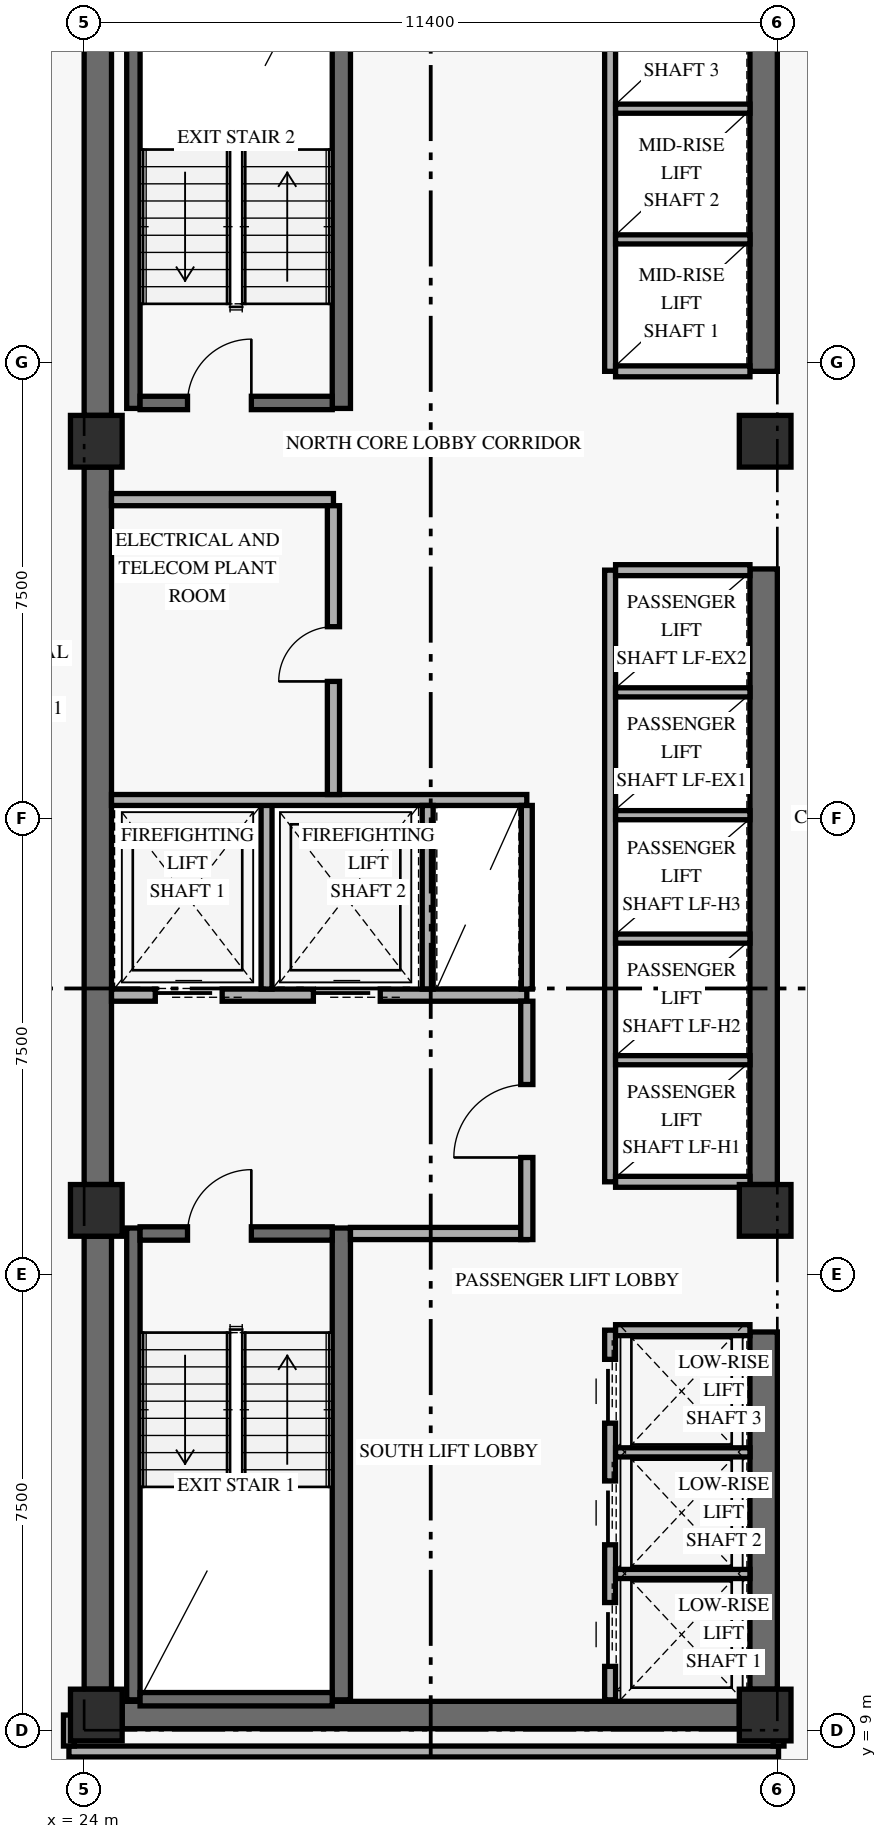
"""IFC4 building model, lengths in metres.
Left out: names, types, materials, properties, quantities, classifications, styles, units other than length and angle.
Written with IfcOpenShell. Run it as: python <this file> out.ifc"""

import sys

from ifc_helpers import new_model, si_unit, direction, frame, frame_2d, origin, origin_2d, place, context, subcontext, project, spatial, rectangle, extrude, element, fill, save


model = new_model("IFC4")
c1 = context("Model", 3, precision=1e-05, world=origin(), true_north=direction((0.0, 1.0)))
c2 = subcontext(c1, "Body", "Model", "MODEL_VIEW")
j1 = project(units=[si_unit("LENGTHUNIT", "METRE"), si_unit("PLANEANGLEUNIT", "RADIAN")], contexts=[c1])
p1 = place(None, origin())
s1 = spatial("IfcSite", under=j1, at=p1, CompositionType="ELEMENT")
p2 = place(p1, origin())
s2 = spatial("IfcBuilding", under=s1, at=p2, CompositionType="ELEMENT")
p3 = place(p2, frame((0.0, 0.0, 84.0)))
s3 = spatial("IfcBuildingStorey", under=s2, at=p3, CompositionType="ELEMENT", Elevation=84.0)
p4 = place(p3, frame((24.225, 9.675, 0.0), z_axis=(0.0, 0.0, 1.0), x_axis=(0.0, 1.0, 0.0)))
e1 = element("IfcWall", 1, at=p4, inside=s3, PredefinedType="SHEAR", context=c2, shape_type="SweptSolid", body=[
    extrude(rectangle(XDim=7.45, YDim=0.45, at=frame_2d((3.725, 0.0))), origin(), (0.0, 0.0, 1.0), 2.749),
])
p5 = place(p3, frame((24.225, 17.975, 0.0), z_axis=(0.0, 0.0, 1.0), x_axis=(0.0, 1.0, 0.0)))
e2 = element("IfcWall", 2, at=p5, inside=s3, PredefinedType="SHEAR", context=c2, shape_type="SweptSolid", body=[
    extrude(rectangle(XDim=11.8, YDim=0.45, at=frame_2d((5.9, 0.0))), origin(), (0.0, 0.0, 1.0), 2.749),
])
p6 = place(p3, frame((24.225, 30.625, 0.0), z_axis=(0.0, 0.0, 1.0), x_axis=(0.0, 1.0, 0.0)))
e3 = element("IfcWall", 3, at=p6, inside=s3, PredefinedType="SHEAR", context=c2, shape_type="SweptSolid", body=[
    extrude(rectangle(XDim=7.7, YDim=0.45, at=frame_2d((3.85, 0.0))), origin(), (0.0, 0.0, 1.0), 2.749),
])
p7 = place(p3, frame((35.175, 9.675, 0.0), z_axis=(0.0, 0.0, 1.0), x_axis=(0.0, 1.0, 0.0)))
e4 = element("IfcWall", 4, at=p7, inside=s3, PredefinedType="SHEAR", context=c2, shape_type="SweptSolid", body=[
    extrude(rectangle(XDim=5.875, YDim=0.45, at=frame_2d((2.938, 0.0))), origin(), (0.0, 0.0, 1.0), 2.749),
])
p8 = place(p3, frame((35.175, 17.975, 0.0), z_axis=(0.0, 0.0, 1.0), x_axis=(0.0, 1.0, 0.0)))
e5 = element("IfcWall", 5, at=p8, inside=s3, PredefinedType="SHEAR", context=c2, shape_type="SweptSolid", body=[
    extrude(rectangle(XDim=10.125, YDim=0.45, at=frame_2d((5.062, 0.0))), origin(), (0.0, 0.0, 1.0), 2.749),
])
p9 = place(p3, frame((35.175, 31.35, 0.0), z_axis=(0.0, 0.0, 1.0), x_axis=(0.0, 1.0, 0.0)))
e6 = element("IfcWall", 6, at=p9, inside=s3, PredefinedType="SHEAR", context=c2, shape_type="SweptSolid", body=[
    extrude(rectangle(XDim=6.975, YDim=0.45, at=frame_2d((3.487, 0.0))), origin(), (0.0, 0.0, 1.0), 2.749),
])
p10 = place(p3, frame((24.625, 9.25, 0.0), z_axis=(0.0, 0.0, 1.0), x_axis=(1.0, 0.0, 0.0)))
e7 = element("IfcWall", 7, at=p10, inside=s3, PredefinedType="SHEAR", context=c2, shape_type="SweptSolid", body=[
    extrude(rectangle(XDim=10.15, YDim=0.45, at=frame_2d((5.075, 0.0))), origin(), (0.0, 0.0, 1.0), 3.36),
])
p11 = place(p3, frame((24.81, 9.5, 0.0), z_axis=(0.0, 0.0, 1.0), x_axis=(0.0, 1.0, 0.0)))
e8 = element("IfcWall", 8, at=p11, inside=s3, PredefinedType="SHEAR", context=c2, shape_type="SweptSolid", body=[
    extrude(rectangle(XDim=7.76, YDim=0.22, at=frame_2d((3.88, 0.0))), origin(), (0.0, 0.0, 1.0), 3.36),
])
p12 = place(p3, frame((28.23, 9.5, 0.0), z_axis=(0.0, 0.0, 1.0), x_axis=(0.0, 1.0, 0.0)))
e9 = element("IfcWall", 9, at=p12, inside=s3, PredefinedType="SHEAR", context=c2, shape_type="SweptSolid", body=[
    extrude(rectangle(XDim=7.76, YDim=0.3, at=frame_2d((3.88, 0.0))), origin(), (0.0, 0.0, 1.0), 3.36),
])
p13 = place(p3, frame((24.92, 9.51, 0.0), z_axis=(0.0, 0.0, 1.0), x_axis=(1.0, 0.0, 0.0)))
e10 = element("IfcWall", 10, at=p13, inside=s3, PredefinedType="SHEAR", context=c2, shape_type="SweptSolid", body=[
    extrude(rectangle(XDim=3.16, YDim=0.22, at=frame_2d((1.58, 0.0))), origin(), (0.0, 0.0, 1.0), 3.36),
])
p14 = place(p3, frame((24.92, 17.17, 0.0), z_axis=(0.0, 0.0, 1.0), x_axis=(1.0, 0.0, 0.0)))
e11 = element("IfcWall", 11, at=p14, inside=s3, PredefinedType="SHEAR", context=c2, shape_type="SweptSolid", body=[
    extrude(rectangle(XDim=3.16, YDim=0.22, at=frame_2d((1.58, 0.0))), origin(), (0.0, 0.0, 1.0), 3.36),
])
p15 = place(p14, frame((0.78, 0.0, 0.0)))
e12 = element("IfcOpeningElement", 12, at=p15, cuts=e11, PredefinedType="OPENING", context=c2, shape_type="SweptSolid", body=[
    extrude(rectangle(XDim=1.05, YDim=2.15, at=frame_2d((0.525, 1.075))), frame((0.0, 0.12, 0.0), z_axis=(0.0, -1.0, 0.0), x_axis=(1.0, 0.0, 0.0)), (0.0, 0.0, 1.0), 0.24),
])
p16 = place(p3, frame((24.81, 30.74, 0.0), z_axis=(0.0, 0.0, 1.0), x_axis=(0.0, 1.0, 0.0)))
e13 = element("IfcWall", 13, at=p16, inside=s3, PredefinedType="SHEAR", context=c2, shape_type="SweptSolid", body=[
    extrude(rectangle(XDim=7.76, YDim=0.22, at=frame_2d((3.88, 0.0))), origin(), (0.0, 0.0, 1.0), 3.36),
])
p17 = place(p3, frame((28.23, 30.74, 0.0), z_axis=(0.0, 0.0, 1.0), x_axis=(0.0, 1.0, 0.0)))
e14 = element("IfcWall", 14, at=p17, inside=s3, PredefinedType="SHEAR", context=c2, shape_type="SweptSolid", body=[
    extrude(rectangle(XDim=7.76, YDim=0.3, at=frame_2d((3.88, 0.0))), origin(), (0.0, 0.0, 1.0), 3.36),
])
p18 = place(p3, frame((24.92, 30.83, 0.0), z_axis=(0.0, 0.0, 1.0), x_axis=(1.0, 0.0, 0.0)))
e15 = element("IfcWall", 15, at=p18, inside=s3, PredefinedType="SHEAR", context=c2, shape_type="SweptSolid", body=[
    extrude(rectangle(XDim=3.16, YDim=0.22, at=frame_2d((1.58, 0.0))), origin(), (0.0, 0.0, 1.0), 3.36),
])
p19 = place(p18, frame((0.78, 0.0, 0.0)))
e16 = element("IfcOpeningElement", 16, at=p19, cuts=e15, PredefinedType="OPENING", context=c2, shape_type="SweptSolid", body=[
    extrude(rectangle(XDim=1.05, YDim=2.15, at=frame_2d((0.525, 1.075))), frame((0.0, 0.12, 0.0), z_axis=(0.0, -1.0, 0.0), x_axis=(1.0, 0.0, 0.0)), (0.0, 0.0, 1.0), 0.24),
])
for number, where, z_axis, x_axis in (
    (17, (24.2, 9.25, 0.0), (0.0, 0.0, 1.0), (1.0, 0.0, 0.0)),
    (18, (24.2, 17.55, 0.0), (0.0, 0.0, 1.0), (1.0, 0.0, 0.0)),
    (19, (24.2, 30.2, 0.0), (0.0, 0.0, 1.0), (1.0, 0.0, 0.0)),
    (20, (35.2, 9.25, 0.0), (0.0, 0.0, 1.0), (1.0, 0.0, 0.0)),
    (21, (35.2, 17.55, 0.0), (0.0, 0.0, 1.0), (1.0, 0.0, 0.0)),
    (22, (35.2, 30.2, 0.0), (0.0, 0.0, 1.0), (1.0, 0.0, 0.0)),
):
    element("IfcColumn", number, at=place(p3, frame(where, z_axis=z_axis, x_axis=x_axis)), inside=s3, PredefinedType="COLUMN", context=c2, shape_type="SweptSolid", body=[
        extrude(rectangle(XDim=0.85, YDim=0.85, at=origin_2d()), origin(), (0.0, 0.0, 1.0), 3.6),
    ])
p20 = place(p3, frame((24.45, 21.09, 0.0), z_axis=(0.0, 0.0, 1.0), x_axis=(1.0, 0.0, 0.0)))
e23 = element("IfcWall", 23, at=p20, inside=s3, PredefinedType="STANDARD", context=c2, shape_type="SweptSolid", body=[
    extrude(rectangle(XDim=6.83, YDim=0.2, at=frame_2d((3.415, 0.0))), origin(), (0.0, 0.0, 1.0), 3.36),
])
p21 = place(p20, frame((0.72, 0.0, 0.0)))
e24 = element("IfcOpeningElement", 24, at=p21, cuts=e23, PredefinedType="OPENING", context=c2, shape_type="SweptSolid", body=[
    extrude(rectangle(XDim=1.1, YDim=2.2, at=frame_2d((0.55, 1.1))), frame((0.0, 0.11, 0.0), z_axis=(0.0, -1.0, 0.0), x_axis=(1.0, 0.0, 0.0)), (0.0, 0.0, 1.0), 0.22),
])
p22 = place(p20, frame((3.32, 0.0, 0.0)))
e25 = element("IfcOpeningElement", 25, at=p22, cuts=e23, PredefinedType="OPENING", context=c2, shape_type="SweptSolid", body=[
    extrude(rectangle(XDim=1.1, YDim=2.2, at=frame_2d((0.55, 1.1))), frame((0.0, 0.11, 0.0), z_axis=(0.0, -1.0, 0.0), x_axis=(1.0, 0.0, 0.0)), (0.0, 0.0, 1.0), 0.22),
])
p23 = place(p3, frame((28.38, 17.17, 0.0), z_axis=(0.0, 0.0, 1.0), x_axis=(1.0, 0.0, 0.0)))
e26 = element("IfcWall", 26, at=p23, inside=s3, PredefinedType="STANDARD", context=c2, shape_type="SweptSolid", body=[
    extrude(rectangle(XDim=2.9, YDim=0.2, at=frame_2d((1.45, 0.0))), origin(), (0.0, 0.0, 1.0), 3.36),
])
p24 = place(p3, frame((31.28, 17.07, 0.0), z_axis=(0.0, 0.0, 1.0), x_axis=(0.0, 1.0, 0.0)))
e27 = element("IfcWall", 27, at=p24, inside=s3, PredefinedType="STANDARD", context=c2, shape_type="SweptSolid", body=[
    extrude(rectangle(XDim=3.92, YDim=0.2, at=frame_2d((1.96, 0.0))), origin(), (0.0, 0.0, 1.0), 2.731),
])
p25 = place(p24, frame((1.35, 0.0, 0.0)))
e28 = element("IfcOpeningElement", 28, at=p25, cuts=e27, PredefinedType="OPENING", context=c2, shape_type="SweptSolid", body=[
    extrude(rectangle(XDim=1.2, YDim=2.15, at=frame_2d((0.6, 1.075))), frame((0.0, 0.11, 0.0), z_axis=(0.0, -1.0, 0.0), x_axis=(1.0, 0.0, 0.0)), (0.0, 0.0, 1.0), 0.22),
])
p26 = place(p3, frame((27.0, 21.19, 0.0), z_axis=(0.0, 0.0, 1.0), x_axis=(0.0, 1.0, 0.0)))
e29 = element("IfcWall", 29, at=p26, inside=s3, PredefinedType="STANDARD", context=c2, shape_type="SweptSolid", body=[
    extrude(rectangle(XDim=3.11, YDim=0.18, at=frame_2d((1.555, 0.0))), origin(), (0.0, 0.0, 1.0), 3.36),
])
p27 = place(p3, frame((24.45, 24.3, 0.0), z_axis=(0.0, 0.0, 1.0), x_axis=(1.0, 0.0, 0.0)))
e30 = element("IfcWall", 30, at=p27, inside=s3, PredefinedType="STANDARD", context=c2, shape_type="SweptSolid", body=[
    extrude(rectangle(XDim=6.83, YDim=0.18, at=frame_2d((3.415, 0.0))), origin(), (0.0, 0.0, 1.0), 3.36),
])
for number, where, z_axis, x_axis in (
    (31, (29.65, 21.19, 0.0), (0.0, 0.0, 1.0), (0.0, 1.0, 0.0)),
    (32, (31.28, 21.19, 0.0), (0.0, 0.0, 1.0), (0.0, 1.0, 0.0)),
):
    element("IfcWall", number, at=place(p3, frame(where, z_axis=z_axis, x_axis=x_axis)), inside=s3, PredefinedType="STANDARD", context=c2, shape_type="SweptSolid", body=[
        extrude(rectangle(XDim=3.02, YDim=0.18, at=frame_2d((1.51, 0.0))), origin(), (0.0, 0.0, 1.0), 3.36),
    ])
p28 = place(p3, frame((24.45, 29.24, 0.0), z_axis=(0.0, 0.0, 1.0), x_axis=(1.0, 0.0, 0.0)))
e33 = element("IfcWall", 33, at=p28, inside=s3, PredefinedType="STANDARD", context=c2, shape_type="SweptSolid", body=[
    extrude(rectangle(XDim=3.65, YDim=0.2, at=frame_2d((1.825, 0.0))), origin(), (0.0, 0.0, 1.0), 3.36),
])
p29 = place(p3, frame((28.1, 24.39, 0.0), z_axis=(0.0, 0.0, 1.0), x_axis=(0.0, 1.0, 0.0)))
e34 = element("IfcWall", 34, at=p29, inside=s3, PredefinedType="STANDARD", context=c2, shape_type="SweptSolid", body=[
    extrude(rectangle(XDim=4.75, YDim=0.2, at=frame_2d((2.375, 0.0))), origin(), (0.0, 0.0, 1.0), 3.36),
])
p30 = place(p29, frame((1.86, 0.0, 0.0)))
e35 = element("IfcOpeningElement", 35, at=p30, cuts=e34, PredefinedType="OPENING", context=c2, shape_type="SweptSolid", body=[
    extrude(rectangle(XDim=0.9, YDim=2.1, at=frame_2d((0.45, 1.05))), frame((0.0, 0.11, 0.0), z_axis=(0.0, -1.0, 0.0), x_axis=(1.0, 0.0, 0.0)), (0.0, 0.0, 1.0), 0.22),
])
p31 = place(p3, frame((32.65, 9.5, 0.0), z_axis=(0.0, 0.0, 1.0), x_axis=(0.0, 1.0, 0.0)))
e36 = element("IfcWall", 36, at=p31, inside=s3, PredefinedType="STANDARD", context=c2, shape_type="SweptSolid", body=[
    extrude(rectangle(XDim=6.08, YDim=0.18, at=frame_2d((3.04, 0.0))), origin(), (0.0, 0.0, 1.0), 3.36),
])
p32 = place(p31, frame((0.55, 0.0, 0.0)))
e37 = element("IfcOpeningElement", 37, at=p32, cuts=e36, PredefinedType="OPENING", context=c2, shape_type="SweptSolid", body=[
    extrude(rectangle(XDim=1.05, YDim=2.2, at=frame_2d((0.525, 1.1))), frame((0.0, 0.1, 0.0), z_axis=(0.0, -1.0, 0.0), x_axis=(1.0, 0.0, 0.0)), (0.0, 0.0, 1.0), 0.2),
])
p33 = place(p31, frame((2.55, 0.0, 0.0)))
e38 = element("IfcOpeningElement", 38, at=p33, cuts=e36, PredefinedType="OPENING", context=c2, shape_type="SweptSolid", body=[
    extrude(rectangle(XDim=1.05, YDim=2.2, at=frame_2d((0.525, 1.1))), frame((0.0, 0.1, 0.0), z_axis=(0.0, -1.0, 0.0), x_axis=(1.0, 0.0, 0.0)), (0.0, 0.0, 1.0), 0.2),
])
p34 = place(p31, frame((4.55, 0.0, 0.0)))
e39 = element("IfcOpeningElement", 39, at=p34, cuts=e36, PredefinedType="OPENING", context=c2, shape_type="SweptSolid", body=[
    extrude(rectangle(XDim=1.05, YDim=2.2, at=frame_2d((0.525, 1.1))), frame((0.0, 0.1, 0.0), z_axis=(0.0, -1.0, 0.0), x_axis=(1.0, 0.0, 0.0)), (0.0, 0.0, 1.0), 0.2),
])
p35 = place(p3, frame((32.74, 15.58, 0.0), z_axis=(0.0, 0.0, 1.0), x_axis=(1.0, 0.0, 0.0)))
e40 = element("IfcWall", 40, at=p35, inside=s3, PredefinedType="STANDARD", context=c2, shape_type="SweptSolid", body=[
    extrude(rectangle(XDim=2.21, YDim=0.18, at=frame_2d((1.105, 0.0))), origin(), (0.0, 0.0, 1.0), 3.36),
])
for number, where, z_axis, x_axis in (
    (41, (32.74, 11.57, 0.0), (0.0, 0.0, 1.0), (1.0, 0.0, 0.0)),
    (42, (32.74, 13.57, 0.0), (0.0, 0.0, 1.0), (1.0, 0.0, 0.0)),
):
    element("IfcWall", number, at=place(p3, frame(where, z_axis=z_axis, x_axis=x_axis)), inside=s3, PredefinedType="STANDARD", context=c2, shape_type="SweptSolid", body=[
        extrude(rectangle(XDim=2.21, YDim=0.15, at=frame_2d((1.105, 0.0))), origin(), (0.0, 0.0, 1.0), 3.36),
    ])
p36 = place(p3, frame((32.65, 18.02, 0.0), z_axis=(0.0, 0.0, 1.0), x_axis=(0.0, 1.0, 0.0)))
e43 = element("IfcWall", 43, at=p36, inside=s3, PredefinedType="STANDARD", context=c2, shape_type="SweptSolid", body=[
    extrude(rectangle(XDim=10.06, YDim=0.18, at=frame_2d((5.03, 0.0))), origin(), (0.0, 0.0, 1.0), 3.36),
])
for number, where, z_axis, x_axis in (
    (44, (32.74, 18.02, 0.0), (0.0, 0.0, 1.0), (1.0, 0.0, 0.0)),
    (45, (32.74, 28.08, 0.0), (0.0, 0.0, 1.0), (1.0, 0.0, 0.0)),
):
    element("IfcWall", number, at=place(p3, frame(where, z_axis=z_axis, x_axis=x_axis)), inside=s3, PredefinedType="STANDARD", context=c2, shape_type="SweptSolid", body=[
        extrude(rectangle(XDim=2.21, YDim=0.18, at=frame_2d((1.105, 0.0))), origin(), (0.0, 0.0, 1.0), 3.36),
    ])
for number, where, z_axis, x_axis in (
    (46, (32.74, 20.02, 0.0), (0.0, 0.0, 1.0), (1.0, 0.0, 0.0)),
    (47, (32.74, 22.02, 0.0), (0.0, 0.0, 1.0), (1.0, 0.0, 0.0)),
    (48, (32.74, 24.05, 0.0), (0.0, 0.0, 1.0), (1.0, 0.0, 0.0)),
    (49, (32.74, 26.07, 0.0), (0.0, 0.0, 1.0), (1.0, 0.0, 0.0)),
):
    element("IfcWall", number, at=place(p3, frame(where, z_axis=z_axis, x_axis=x_axis)), inside=s3, PredefinedType="STANDARD", context=c2, shape_type="SweptSolid", body=[
        extrude(rectangle(XDim=2.21, YDim=0.15, at=frame_2d((1.105, 0.0))), origin(), (0.0, 0.0, 1.0), 3.36),
    ])
p37 = place(p3, frame((32.65, 31.35, 0.0), z_axis=(0.0, 0.0, 1.0), x_axis=(0.0, 1.0, 0.0)))
e50 = element("IfcWall", 50, at=p37, inside=s3, PredefinedType="STANDARD", context=c2, shape_type="SweptSolid", body=[
    extrude(rectangle(XDim=7.175, YDim=0.18, at=frame_2d((3.587, 0.0))), origin(), (0.0, 0.0, 1.0), 3.36),
])
p38 = place(p3, frame((32.74, 31.35, 0.0), z_axis=(0.0, 0.0, 1.0), x_axis=(1.0, 0.0, 0.0)))
e51 = element("IfcWall", 51, at=p38, inside=s3, PredefinedType="STANDARD", context=c2, shape_type="SweptSolid", body=[
    extrude(rectangle(XDim=2.21, YDim=0.18, at=frame_2d((1.105, 0.0))), origin(), (0.0, 0.0, 1.0), 3.36),
])
for number, where, z_axis, x_axis in (
    (52, (32.74, 33.52, 0.0), (0.0, 0.0, 1.0), (1.0, 0.0, 0.0)),
    (53, (32.74, 35.67, 0.0), (0.0, 0.0, 1.0), (1.0, 0.0, 0.0)),
):
    element("IfcWall", number, at=place(p3, frame(where, z_axis=z_axis, x_axis=x_axis)), inside=s3, PredefinedType="STANDARD", context=c2, shape_type="SweptSolid", body=[
        extrude(rectangle(XDim=2.21, YDim=0.15, at=frame_2d((1.105, 0.0))), origin(), (0.0, 0.0, 1.0), 3.36),
    ])
p39 = place(p3, frame((23.75, 8.65, 0.0), z_axis=(0.0, 0.0, 1.0), x_axis=(1.0, 0.0, 0.0)))
e54 = element("IfcWall", 54, at=p39, inside=s3, PredefinedType="STANDARD", context=c2, shape_type="SweptSolid", body=[
    extrude(rectangle(XDim=11.67, YDim=0.18, at=frame_2d((5.835, 0.0))), origin(), (0.0, 0.0, 1.0), 2.731),
])
for number, where, z_axis, x_axis in (
    (55, (35.42, 8.74, 0.0), (0.0, 0.0, 1.0), (0.0, 1.0, 0.0)),
    (56, (23.75, 8.74, 0.0), (0.0, 0.0, 1.0), (0.0, 1.0, 0.0)),
):
    element("IfcWall", number, at=place(p3, frame(where, z_axis=z_axis, x_axis=x_axis)), inside=s3, PredefinedType="STANDARD", context=c2, shape_type="SweptSolid", body=[
        extrude(rectangle(XDim=0.51, YDim=0.18, at=frame_2d((0.255, 0.0))), origin(), (0.0, 0.0, 1.0), 2.731),
    ])
p40 = place(p15, frame((1.05, 0.0, 0.0), z_axis=(0.0, 0.0, 1.0), x_axis=(-1.0, 0.0, 0.0)))
e57 = element("IfcDoor", 57, at=p40, inside=s3, OperationType="SINGLE_SWING_LEFT", PredefinedType="DOOR", context=c2, shape_type="SweptSolid", body=[
    extrude(rectangle(XDim=1.05, YDim=2.15, at=frame_2d((0.525, 1.075))), frame((0.0, 0.025, 0.0), z_axis=(0.0, -1.0, 0.0), x_axis=(1.0, 0.0, 0.0)), (0.0, 0.0, 1.0), 0.05),
])
fill(e12, e57)
p41 = place(p19, origin())
e58 = element("IfcDoor", 58, at=p41, inside=s3, OperationType="SINGLE_SWING_RIGHT", PredefinedType="DOOR", context=c2, shape_type="SweptSolid", body=[
    extrude(rectangle(XDim=1.05, YDim=2.15, at=frame_2d((0.525, 1.075))), frame((0.0, 0.025, 0.0), z_axis=(0.0, -1.0, 0.0), x_axis=(1.0, 0.0, 0.0)), (0.0, 0.0, 1.0), 0.05),
])
fill(e16, e58)
p42 = place(p21, origin())
e59 = element("IfcDoor", 59, at=p42, inside=s3, OperationType="SLIDING_TO_LEFT", PredefinedType="DOOR", context=c2, shape_type="SweptSolid", body=[
    extrude(rectangle(XDim=1.1, YDim=2.2, at=frame_2d((0.55, 1.1))), frame((0.0, 0.025, 0.0), z_axis=(0.0, -1.0, 0.0), x_axis=(1.0, 0.0, 0.0)), (0.0, 0.0, 1.0), 0.05),
])
fill(e24, e59)
p43 = place(p22, origin())
e60 = element("IfcDoor", 60, at=p43, inside=s3, OperationType="SLIDING_TO_LEFT", PredefinedType="DOOR", context=c2, shape_type="SweptSolid", body=[
    extrude(rectangle(XDim=1.1, YDim=2.2, at=frame_2d((0.55, 1.1))), frame((0.0, 0.025, 0.0), z_axis=(0.0, -1.0, 0.0), x_axis=(1.0, 0.0, 0.0)), (0.0, 0.0, 1.0), 0.05),
])
fill(e25, e60)
p44 = place(p25, origin())
e61 = element("IfcDoor", 61, at=p44, inside=s3, OperationType="SINGLE_SWING_LEFT", PredefinedType="DOOR", context=c2, shape_type="SweptSolid", body=[
    extrude(rectangle(XDim=1.2, YDim=2.15, at=frame_2d((0.6, 1.075))), frame((0.0, 0.025, 0.0), z_axis=(0.0, -1.0, 0.0), x_axis=(1.0, 0.0, 0.0)), (0.0, 0.0, 1.0), 0.05),
])
fill(e28, e61)
p45 = place(p30, origin())
e62 = element("IfcDoor", 62, at=p45, inside=s3, OperationType="SINGLE_SWING_LEFT", PredefinedType="DOOR", context=c2, shape_type="SweptSolid", body=[
    extrude(rectangle(XDim=0.9, YDim=2.1, at=frame_2d((0.45, 1.05))), frame((0.0, 0.025, 0.0), z_axis=(0.0, -1.0, 0.0), x_axis=(1.0, 0.0, 0.0)), (0.0, 0.0, 1.0), 0.05),
])
fill(e35, e62)
p46 = place(p32, origin())
e63 = element("IfcDoor", 63, at=p46, inside=s3, OperationType="SLIDING_TO_LEFT", PredefinedType="DOOR", context=c2, shape_type="SweptSolid", body=[
    extrude(rectangle(XDim=1.05, YDim=2.2, at=frame_2d((0.525, 1.1))), frame((0.0, 0.025, 0.0), z_axis=(0.0, -1.0, 0.0), x_axis=(1.0, 0.0, 0.0)), (0.0, 0.0, 1.0), 0.05),
])
fill(e37, e63)
p47 = place(p33, origin())
e64 = element("IfcDoor", 64, at=p47, inside=s3, OperationType="SLIDING_TO_LEFT", PredefinedType="DOOR", context=c2, shape_type="SweptSolid", body=[
    extrude(rectangle(XDim=1.05, YDim=2.2, at=frame_2d((0.525, 1.1))), frame((0.0, 0.025, 0.0), z_axis=(0.0, -1.0, 0.0), x_axis=(1.0, 0.0, 0.0)), (0.0, 0.0, 1.0), 0.05),
])
fill(e38, e64)
p48 = place(p34, origin())
e65 = element("IfcDoor", 65, at=p48, inside=s3, OperationType="SLIDING_TO_LEFT", PredefinedType="DOOR", context=c2, shape_type="SweptSolid", body=[
    extrude(rectangle(XDim=1.05, YDim=2.2, at=frame_2d((0.525, 1.1))), frame((0.0, 0.025, 0.0), z_axis=(0.0, -1.0, 0.0), x_axis=(1.0, 0.0, 0.0)), (0.0, 0.0, 1.0), 0.05),
])
fill(e39, e65)
save(model, sys.argv[1])
